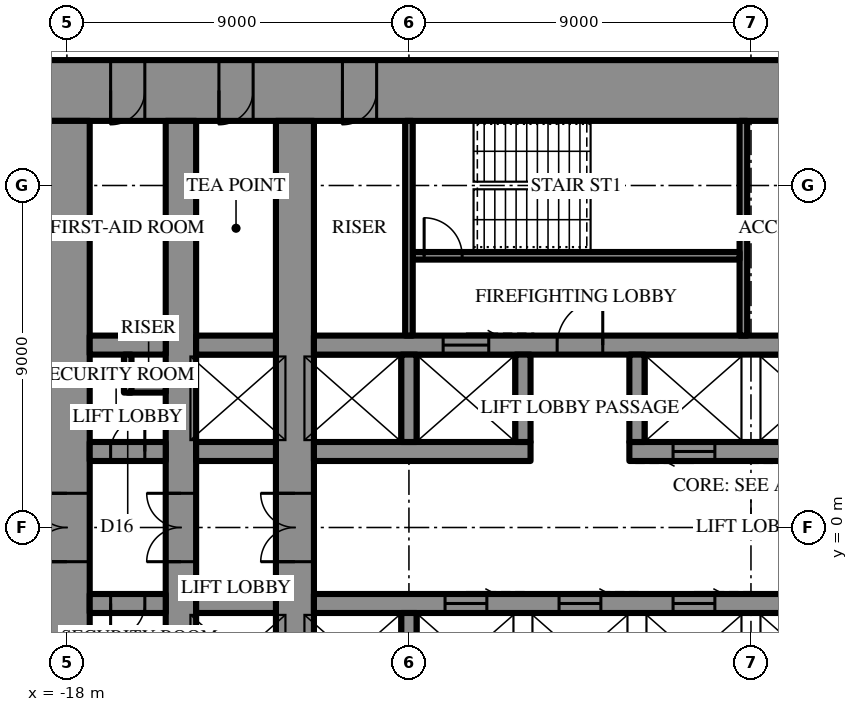
"""IFC4 building model, lengths in metres.
Left out: names, types, materials, properties, quantities, classifications, styles, units other than length and angle.
Written with IfcOpenShell. Run it as: python <this file> out.ifc"""

import sys

from ifc_helpers import new_model, si_unit, direction, frame, frame_2d, origin, place, context, subcontext, project, spatial, rectangle, extrude, element, fill, save


model = new_model("IFC4")
c1 = context("Model", 3, precision=1e-05, world=origin(), true_north=direction((0.0, 1.0)))
c2 = subcontext(c1, "Body", "Model", "MODEL_VIEW")
j1 = project(units=[si_unit("LENGTHUNIT", "METRE"), si_unit("PLANEANGLEUNIT", "RADIAN")], contexts=[c1])
p1 = place(None, origin())
s1 = spatial("IfcSite", under=j1, at=p1, CompositionType="ELEMENT")
p2 = place(p1, origin())
s2 = spatial("IfcBuilding", under=s1, at=p2, CompositionType="ELEMENT")
p3 = place(p2, frame((0.0, 0.0, 199.3)))
s3 = spatial("IfcBuildingStorey", under=s2, at=p3, CompositionType="ELEMENT", Elevation=199.3)
p4 = place(p3, frame((-18.6, 11.5, 0.0), z_axis=(0.0, 0.0, 1.0), x_axis=(1.0, 0.0, 0.0)))
e1 = element("IfcWall", 1, at=p4, inside=s3, PredefinedType="SHEAR", context=c2, shape_type="SweptSolid", body=[
    extrude(rectangle(XDim=37.2, YDim=1.6, at=frame_2d((18.6, 0.0))), origin(), (0.0, 0.0, 1.0), 4.2),
])
p5 = place(p4, frame((19.45, 0.0, 0.0)))
e2 = element("IfcOpeningElement", 2, at=p5, cuts=e1, PredefinedType="OPENING", context=c2, shape_type="SweptSolid", body=[
    extrude(rectangle(XDim=0.9, YDim=2.2, at=frame_2d((0.45, 1.1))), frame((0.0, 0.81, 0.0), z_axis=(0.0, -1.0, 0.0), x_axis=(1.0, 0.0, 0.0)), (0.0, 0.0, 1.0), 1.62),
])
p6 = place(p4, frame((22.45, 0.0, 0.0)))
e3 = element("IfcOpeningElement", 3, at=p6, cuts=e1, PredefinedType="OPENING", context=c2, shape_type="SweptSolid", body=[
    extrude(rectangle(XDim=0.9, YDim=2.2, at=frame_2d((0.45, 1.1))), frame((0.0, 0.81, 0.0), z_axis=(0.0, -1.0, 0.0), x_axis=(1.0, 0.0, 0.0)), (0.0, 0.0, 1.0), 1.62),
])
p7 = place(p4, frame((25.5, 0.0, 0.0)))
e4 = element("IfcOpeningElement", 4, at=p7, cuts=e1, PredefinedType="OPENING", context=c2, shape_type="SweptSolid", body=[
    extrude(rectangle(XDim=1.0, YDim=2.2, at=frame_2d((0.5, 1.1))), frame((0.0, 0.81, 0.0), z_axis=(0.0, -1.0, 0.0), x_axis=(1.0, 0.0, 0.0)), (0.0, 0.0, 1.0), 1.62),
])
p8 = place(p4, frame((1.75, 0.0, 0.0)))
e5 = element("IfcOpeningElement", 5, at=p8, cuts=e1, PredefinedType="OPENING", context=c2, shape_type="SweptSolid", body=[
    extrude(rectangle(XDim=0.9, YDim=2.2, at=frame_2d((0.45, 1.1))), frame((0.0, 0.81, 0.0), z_axis=(0.0, -1.0, 0.0), x_axis=(1.0, 0.0, 0.0)), (0.0, 0.0, 1.0), 1.62),
])
p9 = place(p4, frame((4.6, 0.0, 0.0)))
e6 = element("IfcOpeningElement", 6, at=p9, cuts=e1, PredefinedType="OPENING", context=c2, shape_type="SweptSolid", body=[
    extrude(rectangle(XDim=0.9, YDim=2.2, at=frame_2d((0.45, 1.1))), frame((0.0, 0.81, 0.0), z_axis=(0.0, -1.0, 0.0), x_axis=(1.0, 0.0, 0.0)), (0.0, 0.0, 1.0), 1.62),
])
p10 = place(p4, frame((7.85, 0.0, 0.0)))
e7 = element("IfcOpeningElement", 7, at=p10, cuts=e1, PredefinedType="OPENING", context=c2, shape_type="SweptSolid", body=[
    extrude(rectangle(XDim=0.9, YDim=2.2, at=frame_2d((0.45, 1.1))), frame((0.0, 0.81, 0.0), z_axis=(0.0, -1.0, 0.0), x_axis=(1.0, 0.0, 0.0)), (0.0, 0.0, 1.0), 1.62),
])
p11 = place(p4, frame((28.45, 0.0, 0.0)))
e8 = element("IfcOpeningElement", 8, at=p11, cuts=e1, PredefinedType="OPENING", context=c2, shape_type="SweptSolid", body=[
    extrude(rectangle(XDim=0.9, YDim=2.2, at=frame_2d((0.45, 1.1))), frame((0.0, 0.81, 0.0), z_axis=(0.0, -1.0, 0.0), x_axis=(1.0, 0.0, 0.0)), (0.0, 0.0, 1.0), 1.62),
])
p12 = place(p4, frame((31.7, 0.0, 0.0)))
e9 = element("IfcOpeningElement", 9, at=p12, cuts=e1, PredefinedType="OPENING", context=c2, shape_type="SweptSolid", body=[
    extrude(rectangle(XDim=0.9, YDim=2.2, at=frame_2d((0.45, 1.1))), frame((0.0, 0.81, 0.0), z_axis=(0.0, -1.0, 0.0), x_axis=(1.0, 0.0, 0.0)), (0.0, 0.0, 1.0), 1.62),
])
p13 = place(p4, frame((34.55, 0.0, 0.0)))
e10 = element("IfcOpeningElement", 10, at=p13, cuts=e1, PredefinedType="OPENING", context=c2, shape_type="SweptSolid", body=[
    extrude(rectangle(XDim=0.9, YDim=2.2, at=frame_2d((0.45, 1.1))), frame((0.0, 0.81, 0.0), z_axis=(0.0, -1.0, 0.0), x_axis=(1.0, 0.0, 0.0)), (0.0, 0.0, 1.0), 1.62),
])
p14 = place(p3, frame((-18.0, 10.7, 0.0), z_axis=(0.0, 0.0, 1.0), x_axis=(0.0, -1.0, 0.0)))
e11 = element("IfcWall", 11, at=p14, inside=s3, PredefinedType="SHEAR", context=c2, shape_type="SweptSolid", body=[
    extrude(rectangle(XDim=21.4, YDim=1.2, at=frame_2d((10.7, 0.0))), origin(), (0.0, 0.0, 1.0), 4.2),
])
p15 = place(p14, frame((9.8, 0.0, 0.0)))
e12 = element("IfcOpeningElement", 12, at=p15, cuts=e11, PredefinedType="OPENING", context=c2, shape_type="SweptSolid", body=[
    extrude(rectangle(XDim=1.8, YDim=2.4, at=frame_2d((0.9, 1.2))), frame((0.0, 0.61, 0.0), z_axis=(0.0, -1.0, 0.0), x_axis=(1.0, 0.0, 0.0)), (0.0, 0.0, 1.0), 1.22),
])
p16 = place(p3, frame((-12.0, -10.7, 0.0), z_axis=(0.0, 0.0, 1.0), x_axis=(0.0, 1.0, 0.0)))
e13 = element("IfcWall", 13, at=p16, inside=s3, PredefinedType="SHEAR", context=c2, shape_type="SweptSolid", body=[
    extrude(rectangle(XDim=21.4, YDim=1.0, at=frame_2d((10.7, 0.0))), origin(), (0.0, 0.0, 1.0), 4.2),
])
p17 = place(p16, frame((9.8, 0.0, 0.0)))
e14 = element("IfcOpeningElement", 14, at=p17, cuts=e13, PredefinedType="OPENING", context=c2, shape_type="SweptSolid", body=[
    extrude(rectangle(XDim=1.8, YDim=2.4, at=frame_2d((0.9, 1.2))), frame((0.0, 0.51, 0.0), z_axis=(0.0, -1.0, 0.0), x_axis=(1.0, 0.0, 0.0)), (0.0, 0.0, 1.0), 1.02),
])
p18 = place(p3, frame((-15.0, -10.7, 0.0), z_axis=(0.0, 0.0, 1.0), x_axis=(0.0, 1.0, 0.0)))
e15 = element("IfcWall", 15, at=p18, inside=s3, PredefinedType="SHEAR", context=c2, shape_type="SweptSolid", body=[
    extrude(rectangle(XDim=21.4, YDim=0.8, at=frame_2d((10.7, 0.0))), origin(), (0.0, 0.0, 1.0), 4.2),
])
p19 = place(p18, frame((9.8, 0.0, 0.0)))
e16 = element("IfcOpeningElement", 16, at=p19, cuts=e15, PredefinedType="OPENING", context=c2, shape_type="SweptSolid", body=[
    extrude(rectangle(XDim=1.8, YDim=2.4, at=frame_2d((0.9, 1.2))), frame((0.0, 0.41, 0.0), z_axis=(0.0, -1.0, 0.0), x_axis=(1.0, 0.0, 0.0)), (0.0, 0.0, 1.0), 0.82),
])
p20 = place(p3, frame((-17.4, 2.0, 0.0), z_axis=(0.0, 0.0, 1.0), x_axis=(1.0, 0.0, 0.0)))
e17 = element("IfcWall", 17, at=p20, inside=s3, PredefinedType="SHEAR", context=c2, shape_type="SweptSolid", body=[
    extrude(rectangle(XDim=2.0, YDim=0.5, at=frame_2d((1.0, 0.0))), origin(), (0.0, 0.0, 1.0), 4.2),
])
p21 = place(p20, frame((0.55, 0.0, 0.0)))
e18 = element("IfcOpeningElement", 18, at=p21, cuts=e17, PredefinedType="OPENING", context=c2, shape_type="SweptSolid", body=[
    extrude(rectangle(XDim=0.9, YDim=2.2, at=frame_2d((0.45, 1.1))), frame((0.0, 0.26, 0.0), z_axis=(0.0, -1.0, 0.0), x_axis=(1.0, 0.0, 0.0)), (0.0, 0.0, 1.0), 0.52),
])
p22 = place(p3, frame((-14.6, 2.0, 0.0), z_axis=(0.0, 0.0, 1.0), x_axis=(1.0, 0.0, 0.0)))
e19 = element("IfcWall", 19, at=p22, inside=s3, PredefinedType="SHEAR", context=c2, shape_type="SweptSolid", body=[
    extrude(rectangle(XDim=2.1, YDim=0.5, at=frame_2d((1.05, 0.0))), origin(), (0.0, 0.0, 1.0), 4.2),
])
p23 = place(p3, frame((-11.5, 2.0, 0.0), z_axis=(0.0, 0.0, 1.0), x_axis=(1.0, 0.0, 0.0)))
e20 = element("IfcWall", 20, at=p23, inside=s3, PredefinedType="SHEAR", context=c2, shape_type="SweptSolid", body=[
    extrude(rectangle(XDim=5.7, YDim=0.5, at=frame_2d((2.85, 0.0))), origin(), (0.0, 0.0, 1.0), 4.2),
])
p24 = place(p3, frame((-3.2, 2.0, 0.0), z_axis=(0.0, 0.0, 1.0), x_axis=(1.0, 0.0, 0.0)))
e21 = element("IfcWall", 21, at=p24, inside=s3, PredefinedType="SHEAR", context=c2, shape_type="SweptSolid", body=[
    extrude(rectangle(XDim=14.7, YDim=0.5, at=frame_2d((7.35, 0.0))), origin(), (0.0, 0.0, 1.0), 4.2),
])
p25 = place(p24, frame((1.15, 0.0, 0.0)))
e22 = element("IfcOpeningElement", 22, at=p25, cuts=e21, PredefinedType="OPENING", context=c2, shape_type="SweptSolid", body=[
    extrude(rectangle(XDim=1.1, YDim=2.2, at=frame_2d((0.55, 1.1))), frame((0.0, 0.26, 0.0), z_axis=(0.0, -1.0, 0.0), x_axis=(1.0, 0.0, 0.0)), (0.0, 0.0, 1.0), 0.52),
])
p26 = place(p24, frame((4.15, 0.0, 0.0)))
e23 = element("IfcOpeningElement", 23, at=p26, cuts=e21, PredefinedType="OPENING", context=c2, shape_type="SweptSolid", body=[
    extrude(rectangle(XDim=1.1, YDim=2.2, at=frame_2d((0.55, 1.1))), frame((0.0, 0.26, 0.0), z_axis=(0.0, -1.0, 0.0), x_axis=(1.0, 0.0, 0.0)), (0.0, 0.0, 1.0), 0.52),
])
p27 = place(p24, frame((7.15, 0.0, 0.0)))
e24 = element("IfcOpeningElement", 24, at=p27, cuts=e21, PredefinedType="OPENING", context=c2, shape_type="SweptSolid", body=[
    extrude(rectangle(XDim=1.1, YDim=2.2, at=frame_2d((0.55, 1.1))), frame((0.0, 0.26, 0.0), z_axis=(0.0, -1.0, 0.0), x_axis=(1.0, 0.0, 0.0)), (0.0, 0.0, 1.0), 0.52),
])
p28 = place(p24, frame((10.15, 0.0, 0.0)))
e25 = element("IfcOpeningElement", 25, at=p28, cuts=e21, PredefinedType="OPENING", context=c2, shape_type="SweptSolid", body=[
    extrude(rectangle(XDim=1.1, YDim=2.2, at=frame_2d((0.55, 1.1))), frame((0.0, 0.26, 0.0), z_axis=(0.0, -1.0, 0.0), x_axis=(1.0, 0.0, 0.0)), (0.0, 0.0, 1.0), 0.52),
])
p29 = place(p3, frame((-17.4, 4.8, 0.0), z_axis=(0.0, 0.0, 1.0), x_axis=(1.0, 0.0, 0.0)))
e26 = element("IfcWall", 26, at=p29, inside=s3, PredefinedType="SHEAR", context=c2, shape_type="SweptSolid", body=[
    extrude(rectangle(XDim=2.0, YDim=0.5, at=frame_2d((1.0, 0.0))), origin(), (0.0, 0.0, 1.0), 4.2),
])
p30 = place(p3, frame((-14.6, 4.8, 0.0), z_axis=(0.0, 0.0, 1.0), x_axis=(1.0, 0.0, 0.0)))
e27 = element("IfcWall", 27, at=p30, inside=s3, PredefinedType="SHEAR", context=c2, shape_type="SweptSolid", body=[
    extrude(rectangle(XDim=2.1, YDim=0.5, at=frame_2d((1.05, 0.0))), origin(), (0.0, 0.0, 1.0), 4.2),
])
p31 = place(p3, frame((-11.5, 4.8, 0.0), z_axis=(0.0, 0.0, 1.0), x_axis=(1.0, 0.0, 0.0)))
e28 = element("IfcWall", 28, at=p31, inside=s3, PredefinedType="SHEAR", context=c2, shape_type="SweptSolid", body=[
    extrude(rectangle(XDim=23.0, YDim=0.5, at=frame_2d((11.5, 0.0))), origin(), (0.0, 0.0, 1.0), 4.2),
])
p32 = place(p31, frame((6.4, 0.0, 0.0)))
e29 = element("IfcOpeningElement", 29, at=p32, cuts=e28, PredefinedType="OPENING", context=c2, shape_type="SweptSolid", body=[
    extrude(rectangle(XDim=1.2, YDim=2.2, at=frame_2d((0.6, 1.1))), frame((0.0, 0.26, 0.0), z_axis=(0.0, -1.0, 0.0), x_axis=(1.0, 0.0, 0.0)), (0.0, 0.0, 1.0), 0.52),
])
p33 = place(p31, frame((3.4, 0.0, 0.0)))
e30 = element("IfcOpeningElement", 30, at=p33, cuts=e28, PredefinedType="OPENING", context=c2, shape_type="SweptSolid", body=[
    extrude(rectangle(XDim=1.2, YDim=2.2, at=frame_2d((0.6, 1.1))), frame((0.0, 0.26, 0.0), z_axis=(0.0, -1.0, 0.0), x_axis=(1.0, 0.0, 0.0)), (0.0, 0.0, 1.0), 0.52),
])
for number, where, z_axis, x_axis in (
    (31, (-9.0, 2.25, 0.0), (0.0, 0.0, 1.0), (0.0, 1.0, 0.0)),
    (32, (-6.0, 2.25, 0.0), (0.0, 0.0, 1.0), (0.0, 1.0, 0.0)),
    (33, (-3.0, 2.25, 0.0), (0.0, 0.0, 1.0), (0.0, 1.0, 0.0)),
):
    element("IfcWall", number, at=place(p3, frame(where, z_axis=z_axis, x_axis=x_axis)), inside=s3, PredefinedType="SHEAR", context=c2, shape_type="SweptSolid", body=[
        extrude(rectangle(XDim=2.3, YDim=0.4, at=frame_2d((1.15, 0.0))), origin(), (0.0, 0.0, 1.0), 4.2),
    ])
p34 = place(p3, frame((-0.2, 5.05, 0.0), z_axis=(0.0, 0.0, 1.0), x_axis=(0.0, 1.0, 0.0)))
e34 = element("IfcWall", 34, at=p34, inside=s3, PredefinedType="SHEAR", context=c2, shape_type="SweptSolid", body=[
    extrude(rectangle(XDim=5.65, YDim=0.2, at=frame_2d((2.825, 0.0))), origin(), (0.0, 0.0, 1.0), 4.2),
])
p35 = place(p3, frame((-8.9, 7.15, 0.0), z_axis=(0.0, 0.0, 1.0), x_axis=(1.0, 0.0, 0.0)))
e35 = element("IfcWall", 35, at=p35, inside=s3, PredefinedType="SHEAR", context=c2, shape_type="SweptSolid", body=[
    extrude(rectangle(XDim=8.6, YDim=0.2, at=frame_2d((4.3, 0.0))), origin(), (0.0, 0.0, 1.0), 4.2),
])
p36 = place(p35, frame((0.3, 0.0, 0.0)))
e36 = element("IfcOpeningElement", 36, at=p36, cuts=e35, PredefinedType="OPENING", context=c2, shape_type="SweptSolid", body=[
    extrude(rectangle(XDim=1.0, YDim=2.2, at=frame_2d((0.5, 1.1))), frame((0.0, 0.11, 0.0), z_axis=(0.0, -1.0, 0.0), x_axis=(1.0, 0.0, 0.0)), (0.0, 0.0, 1.0), 0.22),
])
p37 = place(p3, frame((3.2, -2.0, 0.0), z_axis=(0.0, 0.0, 1.0), x_axis=(-1.0, 0.0, 0.0)))
e37 = element("IfcWall", 37, at=p37, inside=s3, PredefinedType="SHEAR", context=c2, shape_type="SweptSolid", body=[
    extrude(rectangle(XDim=14.7, YDim=0.5, at=frame_2d((7.35, 0.0))), origin(), (0.0, 0.0, 1.0), 4.2),
])
p38 = place(p37, frame((1.15, 0.0, 0.0)))
e38 = element("IfcOpeningElement", 38, at=p38, cuts=e37, PredefinedType="OPENING", context=c2, shape_type="SweptSolid", body=[
    extrude(rectangle(XDim=1.1, YDim=2.2, at=frame_2d((0.55, 1.1))), frame((0.0, 0.26, 0.0), z_axis=(0.0, -1.0, 0.0), x_axis=(1.0, 0.0, 0.0)), (0.0, 0.0, 1.0), 0.52),
])
p39 = place(p37, frame((4.15, 0.0, 0.0)))
e39 = element("IfcOpeningElement", 39, at=p39, cuts=e37, PredefinedType="OPENING", context=c2, shape_type="SweptSolid", body=[
    extrude(rectangle(XDim=1.1, YDim=2.2, at=frame_2d((0.55, 1.1))), frame((0.0, 0.26, 0.0), z_axis=(0.0, -1.0, 0.0), x_axis=(1.0, 0.0, 0.0)), (0.0, 0.0, 1.0), 0.52),
])
p40 = place(p37, frame((7.15, 0.0, 0.0)))
e40 = element("IfcOpeningElement", 40, at=p40, cuts=e37, PredefinedType="OPENING", context=c2, shape_type="SweptSolid", body=[
    extrude(rectangle(XDim=1.1, YDim=2.2, at=frame_2d((0.55, 1.1))), frame((0.0, 0.26, 0.0), z_axis=(0.0, -1.0, 0.0), x_axis=(1.0, 0.0, 0.0)), (0.0, 0.0, 1.0), 0.52),
])
p41 = place(p37, frame((10.15, 0.0, 0.0)))
e41 = element("IfcOpeningElement", 41, at=p41, cuts=e37, PredefinedType="OPENING", context=c2, shape_type="SweptSolid", body=[
    extrude(rectangle(XDim=1.1, YDim=2.2, at=frame_2d((0.55, 1.1))), frame((0.0, 0.26, 0.0), z_axis=(0.0, -1.0, 0.0), x_axis=(1.0, 0.0, 0.0)), (0.0, 0.0, 1.0), 0.52),
])
p42 = place(p3, frame((-12.5, -2.0, 0.0), z_axis=(0.0, 0.0, 1.0), x_axis=(-1.0, 0.0, 0.0)))
e42 = element("IfcWall", 42, at=p42, inside=s3, PredefinedType="SHEAR", context=c2, shape_type="SweptSolid", body=[
    extrude(rectangle(XDim=2.1, YDim=0.5, at=frame_2d((1.05, 0.0))), origin(), (0.0, 0.0, 1.0), 4.2),
])
p43 = place(p3, frame((-15.4, -2.0, 0.0), z_axis=(0.0, 0.0, 1.0), x_axis=(-1.0, 0.0, 0.0)))
e43 = element("IfcWall", 43, at=p43, inside=s3, PredefinedType="SHEAR", context=c2, shape_type="SweptSolid", body=[
    extrude(rectangle(XDim=2.0, YDim=0.5, at=frame_2d((1.0, 0.0))), origin(), (0.0, 0.0, 1.0), 4.2),
])
p44 = place(p43, frame((0.55, 0.0, 0.0)))
e44 = element("IfcOpeningElement", 44, at=p44, cuts=e43, PredefinedType="OPENING", context=c2, shape_type="SweptSolid", body=[
    extrude(rectangle(XDim=0.9, YDim=2.2, at=frame_2d((0.45, 1.1))), frame((0.0, 0.26, 0.0), z_axis=(0.0, -1.0, 0.0), x_axis=(1.0, 0.0, 0.0)), (0.0, 0.0, 1.0), 0.52),
])
p45 = place(p3, frame((-9.0, -2.25, 0.0), z_axis=(0.0, 0.0, 1.0), x_axis=(0.0, -1.0, 0.0)))
e45 = element("IfcWall", 45, at=p45, inside=s3, PredefinedType="SHEAR", context=c2, shape_type="SweptSolid", body=[
    extrude(rectangle(XDim=2.3, YDim=0.4, at=frame_2d((1.15, 0.0))), origin(), (0.0, 0.0, 1.0), 4.2),
])
p46 = place(p3, frame((-9.0, 5.05, 0.0), z_axis=(0.0, 0.0, 1.0), x_axis=(0.0, 1.0, 0.0)))
e46 = element("IfcWall", 46, at=p46, inside=s3, PredefinedType="PARTITIONING", context=c2, shape_type="SweptSolid", body=[
    extrude(rectangle(XDim=5.65, YDim=0.2, at=frame_2d((2.825, 0.0))), origin(), (0.0, 0.0, 1.0), 3.9),
])
for number, where, z_axis, x_axis in (
    (47, (-16.4, 3.65, 0.0), (0.0, 0.0, 1.0), (1.0, 0.0, 0.0)),
    (48, (-16.4, 3.55, 0.0), (0.0, 0.0, 1.0), (0.0, 1.0, 0.0)),
):
    element("IfcWall", number, at=place(p3, frame(where, z_axis=z_axis, x_axis=x_axis)), inside=s3, PredefinedType="PARTITIONING", context=c2, shape_type="SweptSolid", body=[
        extrude(rectangle(XDim=1.0, YDim=0.2, at=frame_2d((0.5, 0.0))), origin(), (0.0, 0.0, 1.0), 3.9),
    ])
p47 = place(p15, frame((1.8, 0.0, 0.0), z_axis=(0.0, 0.0, 1.0), x_axis=(-1.0, 0.0, 0.0)))
e49 = element("IfcDoor", 49, at=p47, inside=s3, OperationType="DOUBLE_DOOR_SINGLE_SWING", PredefinedType="DOOR", context=c2, shape_type="SweptSolid", body=[
    extrude(rectangle(XDim=1.8, YDim=2.4, at=frame_2d((0.9, 1.2))), frame((0.0, 0.025, 0.0), z_axis=(0.0, -1.0, 0.0), x_axis=(1.0, 0.0, 0.0)), (0.0, 0.0, 1.0), 0.05),
])
fill(e12, e49)
p48 = place(p32, origin())
e50 = element("IfcDoor", 50, at=p48, inside=s3, OperationType="SINGLE_SWING_LEFT", PredefinedType="DOOR", context=c2, shape_type="SweptSolid", body=[
    extrude(rectangle(XDim=1.2, YDim=2.2, at=frame_2d((0.6, 1.1))), frame((0.0, 0.025, 0.0), z_axis=(0.0, -1.0, 0.0), x_axis=(1.0, 0.0, 0.0)), (0.0, 0.0, 1.0), 0.05),
])
fill(e29, e50)
p49 = place(p36, origin())
e51 = element("IfcDoor", 51, at=p49, inside=s3, OperationType="SINGLE_SWING_RIGHT", PredefinedType="DOOR", context=c2, shape_type="SweptSolid", body=[
    extrude(rectangle(XDim=1.0, YDim=2.2, at=frame_2d((0.5, 1.1))), frame((0.0, 0.025, 0.0), z_axis=(0.0, -1.0, 0.0), x_axis=(1.0, 0.0, 0.0)), (0.0, 0.0, 1.0), 0.05),
])
fill(e36, e51)
p50 = place(p8, frame((0.9, 0.0, 0.0), z_axis=(0.0, 0.0, 1.0), x_axis=(-1.0, 0.0, 0.0)))
e52 = element("IfcDoor", 52, at=p50, inside=s3, OperationType="SINGLE_SWING_LEFT", PredefinedType="DOOR", context=c2, shape_type="SweptSolid", body=[
    extrude(rectangle(XDim=0.9, YDim=2.2, at=frame_2d((0.45, 1.1))), frame((0.0, 0.025, 0.0), z_axis=(0.0, -1.0, 0.0), x_axis=(1.0, 0.0, 0.0)), (0.0, 0.0, 1.0), 0.05),
])
fill(e5, e52)
p51 = place(p9, frame((0.9, 0.0, 0.0), z_axis=(0.0, 0.0, 1.0), x_axis=(-1.0, 0.0, 0.0)))
e53 = element("IfcDoor", 53, at=p51, inside=s3, OperationType="SINGLE_SWING_LEFT", PredefinedType="DOOR", context=c2, shape_type="SweptSolid", body=[
    extrude(rectangle(XDim=0.9, YDim=2.2, at=frame_2d((0.45, 1.1))), frame((0.0, 0.025, 0.0), z_axis=(0.0, -1.0, 0.0), x_axis=(1.0, 0.0, 0.0)), (0.0, 0.0, 1.0), 0.05),
])
fill(e6, e53)
p52 = place(p10, frame((0.9, 0.0, 0.0), z_axis=(0.0, 0.0, 1.0), x_axis=(-1.0, 0.0, 0.0)))
e54 = element("IfcDoor", 54, at=p52, inside=s3, OperationType="SINGLE_SWING_LEFT", PredefinedType="DOOR", context=c2, shape_type="SweptSolid", body=[
    extrude(rectangle(XDim=0.9, YDim=2.2, at=frame_2d((0.45, 1.1))), frame((0.0, 0.025, 0.0), z_axis=(0.0, -1.0, 0.0), x_axis=(1.0, 0.0, 0.0)), (0.0, 0.0, 1.0), 0.05),
])
fill(e7, e54)
p53 = place(p21, origin())
e55 = element("IfcDoor", 55, at=p53, inside=s3, OperationType="SINGLE_SWING_LEFT", PredefinedType="DOOR", context=c2, shape_type="SweptSolid", body=[
    extrude(rectangle(XDim=0.9, YDim=2.2, at=frame_2d((0.45, 1.1))), frame((0.0, 0.025, 0.0), z_axis=(0.0, -1.0, 0.0), x_axis=(1.0, 0.0, 0.0)), (0.0, 0.0, 1.0), 0.05),
])
fill(e18, e55)
p54 = place(p44, origin())
e56 = element("IfcDoor", 56, at=p54, inside=s3, OperationType="SINGLE_SWING_LEFT", PredefinedType="DOOR", context=c2, shape_type="SweptSolid", body=[
    extrude(rectangle(XDim=0.9, YDim=2.2, at=frame_2d((0.45, 1.1))), frame((0.0, 0.025, 0.0), z_axis=(0.0, -1.0, 0.0), x_axis=(1.0, 0.0, 0.0)), (0.0, 0.0, 1.0), 0.05),
])
fill(e44, e56)
p55 = place(p17, origin())
e57 = element("IfcDoor", 57, at=p55, inside=s3, OperationType="DOUBLE_DOOR_SINGLE_SWING", PredefinedType="DOOR", context=c2, shape_type="SweptSolid", body=[
    extrude(rectangle(XDim=1.8, YDim=2.4, at=frame_2d((0.9, 1.2))), frame((0.0, 0.025, 0.0), z_axis=(0.0, -1.0, 0.0), x_axis=(1.0, 0.0, 0.0)), (0.0, 0.0, 1.0), 0.05),
])
fill(e14, e57)
p56 = place(p19, origin())
e58 = element("IfcDoor", 58, at=p56, inside=s3, OperationType="DOUBLE_DOOR_SINGLE_SWING", PredefinedType="DOOR", context=c2, shape_type="SweptSolid", body=[
    extrude(rectangle(XDim=1.8, YDim=2.4, at=frame_2d((0.9, 1.2))), frame((0.0, 0.025, 0.0), z_axis=(0.0, -1.0, 0.0), x_axis=(1.0, 0.0, 0.0)), (0.0, 0.0, 1.0), 0.05),
])
fill(e16, e58)
p57 = place(p33, origin())
e59 = element("IfcDoor", 59, at=p57, inside=s3, OperationType="SLIDING_TO_LEFT", PredefinedType="DOOR", context=c2, shape_type="SweptSolid", body=[
    extrude(rectangle(XDim=1.2, YDim=2.2, at=frame_2d((0.6, 1.1))), frame((0.0, 0.025, 0.0), z_axis=(0.0, -1.0, 0.0), x_axis=(1.0, 0.0, 0.0)), (0.0, 0.0, 1.0), 0.05),
])
fill(e30, e59)
p58 = place(p25, frame((1.1, 0.0, 0.0), z_axis=(0.0, 0.0, 1.0), x_axis=(-1.0, 0.0, 0.0)))
e60 = element("IfcDoor", 60, at=p58, inside=s3, OperationType="SLIDING_TO_LEFT", PredefinedType="DOOR", context=c2, shape_type="SweptSolid", body=[
    extrude(rectangle(XDim=1.1, YDim=2.2, at=frame_2d((0.55, 1.1))), frame((0.0, 0.025, 0.0), z_axis=(0.0, -1.0, 0.0), x_axis=(1.0, 0.0, 0.0)), (0.0, 0.0, 1.0), 0.05),
])
fill(e22, e60)
p59 = place(p39, frame((1.1, 0.0, 0.0), z_axis=(0.0, 0.0, 1.0), x_axis=(-1.0, 0.0, 0.0)))
e61 = element("IfcDoor", 61, at=p59, inside=s3, OperationType="SLIDING_TO_LEFT", PredefinedType="DOOR", context=c2, shape_type="SweptSolid", body=[
    extrude(rectangle(XDim=1.1, YDim=2.2, at=frame_2d((0.55, 1.1))), frame((0.0, 0.025, 0.0), z_axis=(0.0, -1.0, 0.0), x_axis=(1.0, 0.0, 0.0)), (0.0, 0.0, 1.0), 0.05),
])
fill(e39, e61)
p60 = place(p40, frame((1.1, 0.0, 0.0), z_axis=(0.0, 0.0, 1.0), x_axis=(-1.0, 0.0, 0.0)))
e62 = element("IfcDoor", 62, at=p60, inside=s3, OperationType="SLIDING_TO_LEFT", PredefinedType="DOOR", context=c2, shape_type="SweptSolid", body=[
    extrude(rectangle(XDim=1.1, YDim=2.2, at=frame_2d((0.55, 1.1))), frame((0.0, 0.025, 0.0), z_axis=(0.0, -1.0, 0.0), x_axis=(1.0, 0.0, 0.0)), (0.0, 0.0, 1.0), 0.05),
])
fill(e40, e62)
p61 = place(p41, frame((1.1, 0.0, 0.0), z_axis=(0.0, 0.0, 1.0), x_axis=(-1.0, 0.0, 0.0)))
e63 = element("IfcDoor", 63, at=p61, inside=s3, OperationType="SLIDING_TO_LEFT", PredefinedType="DOOR", context=c2, shape_type="SweptSolid", body=[
    extrude(rectangle(XDim=1.1, YDim=2.2, at=frame_2d((0.55, 1.1))), frame((0.0, 0.025, 0.0), z_axis=(0.0, -1.0, 0.0), x_axis=(1.0, 0.0, 0.0)), (0.0, 0.0, 1.0), 0.05),
])
fill(e41, e63)
save(model, sys.argv[1])
